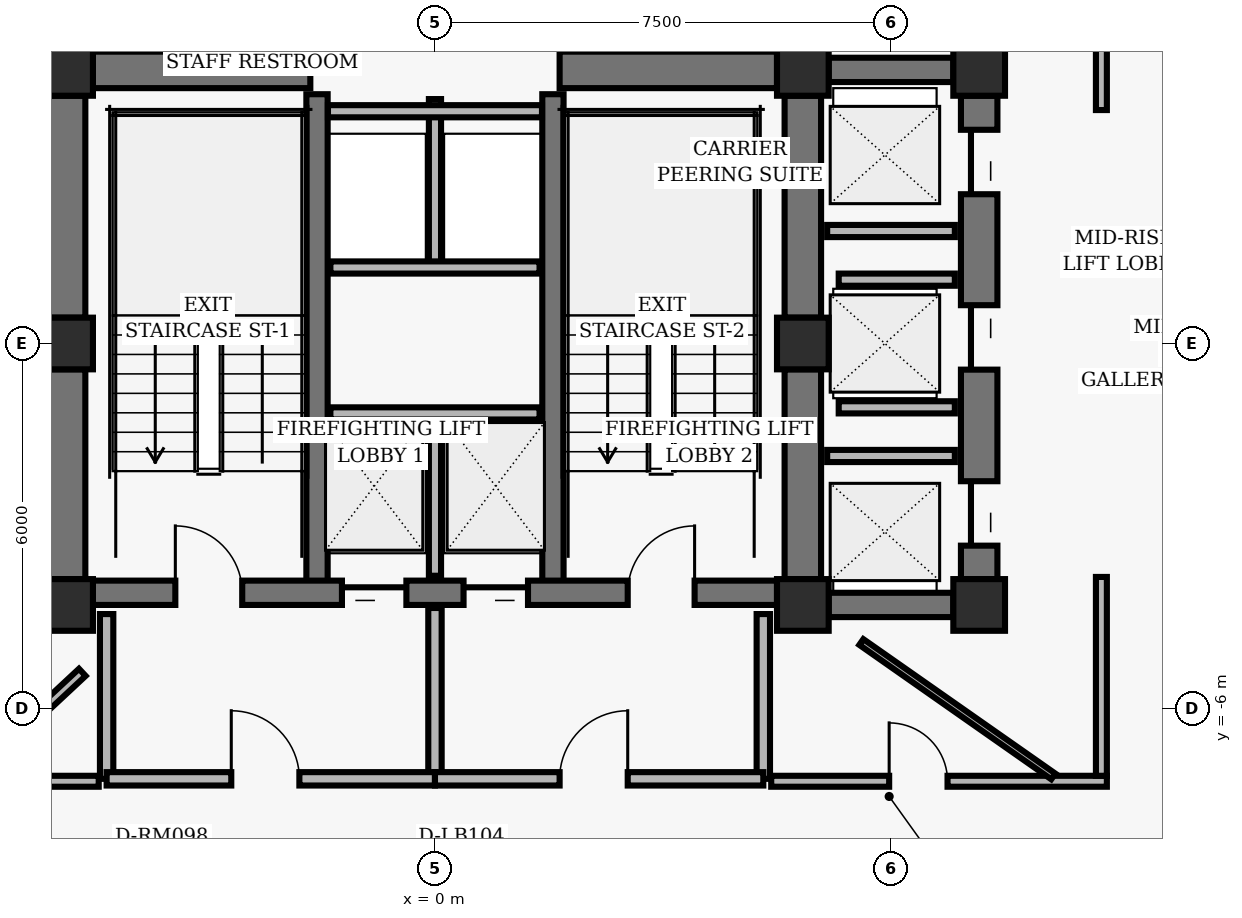
"""IFC4 building model, lengths in metres.
Left out: names, types, materials, properties, quantities, classifications, styles, units other than length and angle.
Written with IfcOpenShell. Run it as: python <this file> out.ifc"""

import sys

from ifc_helpers import new_model, si_unit, direction, frame, frame_2d, origin, origin_2d, place, context, subcontext, project, spatial, rectangle, hollow_rectangle, extrude, element, fill, save


model = new_model("IFC4")
c1 = context("Model", 3, precision=1e-05, world=origin(), true_north=direction((0.0, 1.0)))
c2 = subcontext(c1, "Body", "Model", "MODEL_VIEW")
j1 = project(units=[si_unit("LENGTHUNIT", "METRE"), si_unit("PLANEANGLEUNIT", "RADIAN")], contexts=[c1])
p1 = place(None, origin())
s1 = spatial("IfcSite", under=j1, at=p1, CompositionType="ELEMENT")
p2 = place(p1, origin())
s2 = spatial("IfcBuilding", under=s1, at=p2, CompositionType="ELEMENT")
p3 = place(p2, frame((0.0, 0.0, 113.76)))
s3 = spatial("IfcBuildingStorey", under=s2, at=p3, CompositionType="ELEMENT", Elevation=113.76)
for number, where, z_axis, x_axis in (
    (1, (-6.05, 4.5, 0.0), (0.0, 0.0, 1.0), (1.0, 0.0, 0.0)),
    (2, (6.05, 4.5, 0.0), (0.0, 0.0, 1.0), (1.0, 0.0, 0.0)),
    (3, (-6.05, 0.0, 0.0), (0.0, 0.0, 1.0), (1.0, 0.0, 0.0)),
    (4, (6.05, 0.0, 0.0), (0.0, 0.0, 1.0), (1.0, 0.0, 0.0)),
    (5, (-6.05, -4.3, 0.0), (0.0, 0.0, 1.0), (1.0, 0.0, 0.0)),
    (6, (6.05, -4.3, 0.0), (0.0, 0.0, 1.0), (1.0, 0.0, 0.0)),
    (7, (8.95, 4.5, 0.0), (0.0, 0.0, 1.0), (1.0, 0.0, 0.0)),
    (8, (8.95, -4.3, 0.0), (0.0, 0.0, 1.0), (1.0, 0.0, 0.0)),
):
    element("IfcColumn", number, at=place(p3, frame(where, z_axis=z_axis, x_axis=x_axis)), inside=s3, PredefinedType="COLUMN", context=c2, shape_type="SweptSolid", body=[
        extrude(hollow_rectangle(XDim=0.85, YDim=0.85, WallThickness=0.055, InnerFilletRadius=0.02, OuterFilletRadius=0.04, at=origin_2d()), origin(), (0.0, 0.0, 1.0), 3.04),
    ])
p4 = place(p3, frame((-6.05, 0.425, 0.0), z_axis=(0.0, 0.0, 1.0), x_axis=(0.0, 1.0, 0.0)))
e9 = element("IfcWall", 9, at=p4, inside=s3, PredefinedType="SHEAR", context=c2, shape_type="SweptSolid", body=[
    extrude(rectangle(XDim=3.65, YDim=0.6, at=frame_2d((1.825, 0.0))), origin(), (0.0, 0.0, 1.0), 2.788),
])
p5 = place(p3, frame((-6.05, -3.875, 0.0), z_axis=(0.0, 0.0, 1.0), x_axis=(0.0, 1.0, 0.0)))
e10 = element("IfcWall", 10, at=p5, inside=s3, PredefinedType="SHEAR", context=c2, shape_type="SweptSolid", body=[
    extrude(rectangle(XDim=3.45, YDim=0.6, at=frame_2d((1.725, 0.0))), origin(), (0.0, 0.0, 1.0), 2.788),
])
p6 = place(p3, frame((6.05, 0.425, 0.0), z_axis=(0.0, 0.0, 1.0), x_axis=(0.0, 1.0, 0.0)))
e11 = element("IfcWall", 11, at=p6, inside=s3, PredefinedType="SHEAR", context=c2, shape_type="SweptSolid", body=[
    extrude(rectangle(XDim=3.65, YDim=0.6, at=frame_2d((1.825, 0.0))), origin(), (0.0, 0.0, 1.0), 2.788),
])
p7 = place(p3, frame((6.05, -3.875, 0.0), z_axis=(0.0, 0.0, 1.0), x_axis=(0.0, 1.0, 0.0)))
e12 = element("IfcWall", 12, at=p7, inside=s3, PredefinedType="SHEAR", context=c2, shape_type="SweptSolid", body=[
    extrude(rectangle(XDim=3.45, YDim=0.6, at=frame_2d((1.725, 0.0))), origin(), (0.0, 0.0, 1.0), 2.788),
])
for number, where, z_axis, x_axis in (
    (13, (-1.94, -4.1, 0.0), (0.0, 0.0, 1.0), (0.0, 1.0, 0.0)),
    (14, (1.94, -4.1, 0.0), (0.0, 0.0, 1.0), (0.0, 1.0, 0.0)),
):
    element("IfcWall", number, at=place(p3, frame(where, z_axis=z_axis, x_axis=x_axis)), inside=s3, PredefinedType="SHEAR", context=c2, shape_type="SweptSolid", body=[
        extrude(rectangle(XDim=8.2, YDim=0.35, at=frame_2d((4.1, 0.0))), origin(), (0.0, 0.0, 1.0), 2.788),
    ])
p8 = place(p3, frame((-5.625, -4.1, 0.0), z_axis=(0.0, 0.0, 1.0), x_axis=(1.0, 0.0, 0.0)))
e15 = element("IfcWall", 15, at=p8, inside=s3, PredefinedType="SHEAR", context=c2, shape_type="SweptSolid", body=[
    extrude(rectangle(XDim=11.25, YDim=0.4, at=frame_2d((5.625, 0.0))), origin(), (0.0, 0.0, 1.0), 2.788),
])
p9 = place(p8, frame((1.355, 0.0, 0.0)))
e16 = element("IfcOpeningElement", 16, at=p9, cuts=e15, PredefinedType="OPENING", context=c2, shape_type="SweptSolid", body=[
    extrude(rectangle(XDim=1.1, YDim=2.04, at=frame_2d((0.55, 1.02))), frame((0.0, 0.21, 0.0), z_axis=(0.0, -1.0, 0.0), x_axis=(1.0, 0.0, 0.0)), (0.0, 0.0, 1.0), 0.42),
])
p10 = place(p8, frame((8.795, 0.0, 0.0)))
e17 = element("IfcOpeningElement", 17, at=p10, cuts=e15, PredefinedType="OPENING", context=c2, shape_type="SweptSolid", body=[
    extrude(rectangle(XDim=1.1, YDim=2.04, at=frame_2d((0.55, 1.02))), frame((0.0, 0.21, 0.0), z_axis=(0.0, -1.0, 0.0), x_axis=(1.0, 0.0, 0.0)), (0.0, 0.0, 1.0), 0.42),
])
p11 = place(p8, frame((4.095, 0.0, 0.0)))
e18 = element("IfcOpeningElement", 18, at=p11, cuts=e15, PredefinedType="OPENING", context=c2, shape_type="SweptSolid", body=[
    extrude(rectangle(XDim=1.06, YDim=2.04, at=frame_2d((0.53, 1.02))), frame((0.0, 0.21, 0.0), z_axis=(0.0, -1.0, 0.0), x_axis=(1.0, 0.0, 0.0)), (0.0, 0.0, 1.0), 0.42),
])
p12 = place(p8, frame((6.095, 0.0, 0.0)))
e19 = element("IfcOpeningElement", 19, at=p12, cuts=e15, PredefinedType="OPENING", context=c2, shape_type="SweptSolid", body=[
    extrude(rectangle(XDim=1.06, YDim=2.04, at=frame_2d((0.53, 1.02))), frame((0.0, 0.21, 0.0), z_axis=(0.0, -1.0, 0.0), x_axis=(1.0, 0.0, 0.0)), (0.0, 0.0, 1.0), 0.42),
])
for number, where, z_axis, x_axis in (
    (20, (-5.625, 4.5, 0.0), (0.0, 0.0, 1.0), (1.0, 0.0, 0.0)),
    (21, (2.05, 4.5, 0.0), (0.0, 0.0, 1.0), (1.0, 0.0, 0.0)),
):
    element("IfcWall", number, at=place(p3, frame(where, z_axis=z_axis, x_axis=x_axis)), inside=s3, PredefinedType="SHEAR", context=c2, shape_type="SweptSolid", body=[
        extrude(rectangle(XDim=3.575, YDim=0.6, at=frame_2d((1.788, 0.0))), origin(), (0.0, 0.0, 1.0), 2.788),
    ])
p13 = place(p3, frame((8.95, -3.875, 0.0), z_axis=(0.0, 0.0, 1.0), x_axis=(0.0, 1.0, 0.0)))
e22 = element("IfcWall", 22, at=p13, inside=s3, PredefinedType="SHEAR", context=c2, shape_type="SweptSolid", body=[
    extrude(rectangle(XDim=7.95, YDim=0.6, at=frame_2d((3.975, 0.0))), origin(), (0.0, 0.0, 1.0), 2.788),
])
p14 = place(p13, frame((0.55, 0.0, 0.0)))
e23 = element("IfcOpeningElement", 23, at=p14, cuts=e22, PredefinedType="OPENING", context=c2, shape_type="SweptSolid", body=[
    extrude(rectangle(XDim=1.06, YDim=2.04, at=frame_2d((0.53, 1.02))), frame((0.0, 0.31, 0.0), z_axis=(0.0, -1.0, 0.0), x_axis=(1.0, 0.0, 0.0)), (0.0, 0.0, 1.0), 0.62),
])
p15 = place(p13, frame((3.445, 0.0, 0.0)))
e24 = element("IfcOpeningElement", 24, at=p15, cuts=e22, PredefinedType="OPENING", context=c2, shape_type="SweptSolid", body=[
    extrude(rectangle(XDim=1.06, YDim=2.04, at=frame_2d((0.53, 1.02))), frame((0.0, 0.31, 0.0), z_axis=(0.0, -1.0, 0.0), x_axis=(1.0, 0.0, 0.0)), (0.0, 0.0, 1.0), 0.62),
])
p16 = place(p13, frame((6.33, 0.0, 0.0)))
e25 = element("IfcOpeningElement", 25, at=p16, cuts=e22, PredefinedType="OPENING", context=c2, shape_type="SweptSolid", body=[
    extrude(rectangle(XDim=1.06, YDim=2.04, at=frame_2d((0.53, 1.02))), frame((0.0, 0.31, 0.0), z_axis=(0.0, -1.0, 0.0), x_axis=(1.0, 0.0, 0.0)), (0.0, 0.0, 1.0), 0.62),
])
for number, where, z_axis, x_axis in (
    (26, (6.475, 4.5, 0.0), (0.0, 0.0, 1.0), (1.0, 0.0, 0.0)),
    (27, (6.475, -4.3, 0.0), (0.0, 0.0, 1.0), (1.0, 0.0, 0.0)),
):
    element("IfcWall", number, at=place(p3, frame(where, z_axis=z_axis, x_axis=x_axis)), inside=s3, PredefinedType="SHEAR", context=c2, shape_type="SweptSolid", body=[
        extrude(rectangle(XDim=2.05, YDim=0.4, at=frame_2d((1.025, 0.0))), origin(), (0.0, 0.0, 1.0), 2.788),
    ])
p17 = place(p3, frame((0.0, -3.82, 0.0), z_axis=(0.0, 0.0, 1.0), x_axis=(0.0, 1.0, 0.0)))
e28 = element("IfcWall", 28, at=p17, inside=s3, PredefinedType="PARTITIONING", context=c2, shape_type="SweptSolid", body=[
    extrude(rectangle(XDim=2.67, YDim=0.2, at=frame_2d((1.335, 0.0))), origin(), (0.0, 0.0, 1.0), 2.763),
])
p18 = place(p3, frame((-1.72, -1.15, 0.0), z_axis=(0.0, 0.0, 1.0), x_axis=(1.0, 0.0, 0.0)))
e29 = element("IfcWall", 29, at=p18, inside=s3, PredefinedType="PARTITIONING", context=c2, shape_type="SweptSolid", body=[
    extrude(rectangle(XDim=3.44, YDim=0.2, at=frame_2d((1.72, 0.0))), origin(), (0.0, 0.0, 1.0), 2.763),
])
for number, where, z_axis, x_axis in (
    (30, (-5.4, -7.16, 0.0), (0.0, 0.0, 1.0), (0.0, 1.0, 0.0)),
    (31, (5.4, -7.16, 0.0), (0.0, 0.0, 1.0), (0.0, 1.0, 0.0)),
):
    element("IfcWall", number, at=place(p3, frame(where, z_axis=z_axis, x_axis=x_axis)), inside=s3, PredefinedType="PARTITIONING", context=c2, shape_type="SweptSolid", body=[
        extrude(rectangle(XDim=2.71, YDim=0.22, at=frame_2d((1.355, 0.0))), origin(), (0.0, 0.0, 1.0), 2.763),
    ])
p19 = place(p3, frame((0.0, -7.16, 0.0), z_axis=(0.0, 0.0, 1.0), x_axis=(0.0, 1.0, 0.0)))
e32 = element("IfcWall", 32, at=p19, inside=s3, PredefinedType="PARTITIONING", context=c2, shape_type="SweptSolid", body=[
    extrude(rectangle(XDim=2.81, YDim=0.22, at=frame_2d((1.405, 0.0))), origin(), (0.0, 0.0, 1.0), 2.763),
])
p20 = place(p3, frame((-5.4, -7.16, 0.0), z_axis=(0.0, 0.0, 1.0), x_axis=(1.0, 0.0, 0.0)))
e33 = element("IfcWall", 33, at=p20, inside=s3, PredefinedType="PARTITIONING", context=c2, shape_type="SweptSolid", body=[
    extrude(rectangle(XDim=5.4, YDim=0.22, at=frame_2d((2.7, 0.0))), origin(), (0.0, 0.0, 1.0), 2.33),
])
p21 = place(p20, frame((2.05, 0.0, 0.0)))
e34 = element("IfcOpeningElement", 34, at=p21, cuts=e33, PredefinedType="OPENING", context=c2, shape_type="SweptSolid", body=[
    extrude(rectangle(XDim=1.12, YDim=2.02, at=frame_2d((0.56, 1.01))), frame((0.0, 0.12, 0.0), z_axis=(0.0, -1.0, 0.0), x_axis=(1.0, 0.0, 0.0)), (0.0, 0.0, 1.0), 0.24),
])
p22 = place(p3, frame((0.0, -7.16, 0.0), z_axis=(0.0, 0.0, 1.0), x_axis=(1.0, 0.0, 0.0)))
e35 = element("IfcWall", 35, at=p22, inside=s3, PredefinedType="PARTITIONING", context=c2, shape_type="SweptSolid", body=[
    extrude(rectangle(XDim=5.4, YDim=0.22, at=frame_2d((2.7, 0.0))), origin(), (0.0, 0.0, 1.0), 2.33),
])
p23 = place(p22, frame((2.05, 0.0, 0.0)))
e36 = element("IfcOpeningElement", 36, at=p23, cuts=e35, PredefinedType="OPENING", context=c2, shape_type="SweptSolid", body=[
    extrude(rectangle(XDim=1.12, YDim=2.02, at=frame_2d((0.56, 1.01))), frame((0.0, 0.12, 0.0), z_axis=(0.0, -1.0, 0.0), x_axis=(1.0, 0.0, 0.0)), (0.0, 0.0, 1.0), 0.24),
])
p24 = place(p3, frame((0.0, 1.25, 0.0), z_axis=(0.0, 0.0, 1.0), x_axis=(0.0, 1.0, 0.0)))
e37 = element("IfcWall", 37, at=p24, inside=s3, PredefinedType="PARTITIONING", context=c2, shape_type="SweptSolid", body=[
    extrude(rectangle(XDim=2.77, YDim=0.2, at=frame_2d((1.385, 0.0))), origin(), (0.0, 0.0, 1.0), 2.763),
])
p25 = place(p3, frame((-1.72, 1.25, 0.0), z_axis=(0.0, 0.0, 1.0), x_axis=(1.0, 0.0, 0.0)))
e38 = element("IfcWall", 38, at=p25, inside=s3, PredefinedType="PARTITIONING", context=c2, shape_type="SweptSolid", body=[
    extrude(rectangle(XDim=3.44, YDim=0.2, at=frame_2d((1.72, 0.0))), origin(), (0.0, 0.0, 1.0), 2.763),
])
p26 = place(p3, frame((-1.76, 3.82, 0.0), z_axis=(0.0, 0.0, 1.0), x_axis=(1.0, 0.0, 0.0)))
e39 = element("IfcWall", 39, at=p26, inside=s3, PredefinedType="PARTITIONING", context=c2, shape_type="SweptSolid", body=[
    extrude(rectangle(XDim=3.52, YDim=0.2, at=frame_2d((1.76, 0.0))), origin(), (0.0, 0.0, 1.0), 2.763),
])
for number, where, z_axis, x_axis in (
    (40, (6.45, -1.85, 0.0), (0.0, 0.0, 1.0), (1.0, 0.0, 0.0)),
    (41, (6.45, 1.85, 0.0), (0.0, 0.0, 1.0), (1.0, 0.0, 0.0)),
):
    element("IfcWall", number, at=place(p3, frame(where, z_axis=z_axis, x_axis=x_axis)), inside=s3, PredefinedType="PARTITIONING", context=c2, shape_type="SweptSolid", body=[
        extrude(rectangle(XDim=2.1, YDim=0.2, at=frame_2d((1.05, 0.0))), origin(), (0.0, 0.0, 1.0), 2.763),
    ])
for number, where, z_axis, x_axis in (
    (42, (6.64, -1.05, 0.0), (0.0, 0.0, 1.0), (1.0, 0.0, 0.0)),
    (43, (6.64, 1.05, 0.0), (0.0, 0.0, 1.0), (1.0, 0.0, 0.0)),
):
    element("IfcWall", number, at=place(p3, frame(where, z_axis=z_axis, x_axis=x_axis)), inside=s3, PredefinedType="PARTITIONING", context=c2, shape_type="SweptSolid", body=[
        extrude(rectangle(XDim=1.91, YDim=0.2, at=frame_2d((0.955, 0.0))), origin(), (0.0, 0.0, 1.0), 2.763),
    ])
p27 = place(p3, frame((10.263, 9.077, 0.0), z_axis=(0.0, 0.0, 1.0), x_axis=(0.587780951295, -0.809020119215, 0.0)))
e44 = element("IfcWall", 44, at=p27, inside=s3, PredefinedType="PARTITIONING", context=c2, shape_type="SweptSolid", body=[
    extrude(rectangle(XDim=7.469, YDim=0.18, at=frame_2d((3.734, 0.0))), origin(), (0.0, 0.0, 1.0), 2.763),
])
p28 = place(p27, frame((4.139, 0.0, 0.0)))
e45 = element("IfcOpeningElement", 45, at=p28, cuts=e44, PredefinedType="OPENING", context=c2, shape_type="SweptSolid", body=[
    extrude(rectangle(XDim=0.96, YDim=2.02, at=frame_2d((0.48, 1.01))), frame((0.0, 0.1, 0.0), z_axis=(0.0, -1.0, 0.0), x_axis=(1.0, 0.0, 0.0)), (0.0, 0.0, 1.0), 0.2),
])
p29 = place(p3, frame((5.53, -7.2, 0.0), z_axis=(0.0, 0.0, 1.0), x_axis=(1.0, 0.0, 0.0)))
e46 = element("IfcWall", 46, at=p29, inside=s3, PredefinedType="PARTITIONING", context=c2, shape_type="SweptSolid", body=[
    extrude(rectangle(XDim=5.52, YDim=0.18, at=frame_2d((2.76, 0.0))), origin(), (0.0, 0.0, 1.0), 2.33),
])
p30 = place(p29, frame((1.94, 0.0, 0.0)))
e47 = element("IfcOpeningElement", 47, at=p30, cuts=e46, PredefinedType="OPENING", context=c2, shape_type="SweptSolid", body=[
    extrude(rectangle(XDim=0.96, YDim=2.02, at=frame_2d((0.48, 1.01))), frame((0.0, 0.1, 0.0), z_axis=(0.0, -1.0, 0.0), x_axis=(1.0, 0.0, 0.0)), (0.0, 0.0, 1.0), 0.2),
])
for number, where, z_axis, x_axis in (
    (48, (10.96, -7.11, 0.0), (0.0, 0.0, 1.0), (0.0, 1.0, 0.0)),
    (49, (10.96, 3.84, 0.0), (0.0, 0.0, 1.0), (0.0, 1.0, 0.0)),
):
    element("IfcWall", number, at=place(p3, frame(where, z_axis=z_axis, x_axis=x_axis)), inside=s3, PredefinedType="PARTITIONING", context=c2, shape_type="SweptSolid", body=[
        extrude(rectangle(XDim=3.271, YDim=0.18, at=frame_2d((1.635, 0.0))), origin(), (0.0, 0.0, 1.0), 2.763),
    ])
p31 = place(p3, frame((-6.59, -7.2, 0.0), z_axis=(0.0, 0.0, 1.0), x_axis=(1.0, 0.0, 0.0)))
e50 = element("IfcWall", 50, at=p31, inside=s3, PredefinedType="PARTITIONING", context=c2, shape_type="SweptSolid", body=[
    extrude(rectangle(XDim=1.06, YDim=0.18, at=frame_2d((0.53, 0.0))), origin(), (0.0, 0.0, 1.0), 2.33),
])
p32 = place(p3, frame((-5.8, -5.409, 0.0), z_axis=(0.0, 0.0, 1.0), x_axis=(-0.731304251281, -0.682051385204, 0.0)))
e51 = element("IfcWall", 51, at=p32, inside=s3, PredefinedType="PARTITIONING", context=c2, shape_type="SweptSolid", body=[
    extrude(rectangle(XDim=0.848, YDim=0.16, at=frame_2d((0.424, 0.0))), origin(), (0.0, 0.0, 1.0), 2.763),
])
p33 = place(p3, frame((7.012, -4.91, 0.0), z_axis=(0.0, 0.0, 1.0), x_axis=(0.819130700295, -0.573606917526, 0.0)))
e52 = element("IfcWall", 52, at=p33, inside=s3, PredefinedType="MOVABLE", context=c2, shape_type="SweptSolid", body=[
    extrude(rectangle(XDim=3.853, YDim=0.115, at=frame_2d((1.927, 0.0))), origin(), (0.0, 0.0, 1.0), 2.763),
])
p34 = place(p9, origin())
e53 = element("IfcDoor", 53, at=p34, inside=s3, OperationType="SINGLE_SWING_LEFT", PredefinedType="DOOR", context=c2, shape_type="SweptSolid", body=[
    extrude(rectangle(XDim=1.1, YDim=2.04, at=frame_2d((0.55, 1.02))), frame((0.0, 0.025, 0.0), z_axis=(0.0, -1.0, 0.0), x_axis=(1.0, 0.0, 0.0)), (0.0, 0.0, 1.0), 0.05),
])
fill(e16, e53)
p35 = place(p10, origin())
e54 = element("IfcDoor", 54, at=p35, inside=s3, OperationType="SINGLE_SWING_RIGHT", PredefinedType="DOOR", context=c2, shape_type="SweptSolid", body=[
    extrude(rectangle(XDim=1.1, YDim=2.04, at=frame_2d((0.55, 1.02))), frame((0.0, 0.025, 0.0), z_axis=(0.0, -1.0, 0.0), x_axis=(1.0, 0.0, 0.0)), (0.0, 0.0, 1.0), 0.05),
])
fill(e17, e54)
p36 = place(p11, origin())
e55 = element("IfcDoor", 55, at=p36, inside=s3, OperationType="SLIDING_TO_LEFT", PredefinedType="DOOR", context=c2, shape_type="SweptSolid", body=[
    extrude(rectangle(XDim=1.06, YDim=2.04, at=frame_2d((0.53, 1.02))), frame((0.0, 0.025, 0.0), z_axis=(0.0, -1.0, 0.0), x_axis=(1.0, 0.0, 0.0)), (0.0, 0.0, 1.0), 0.05),
])
fill(e18, e55)
p37 = place(p12, origin())
e56 = element("IfcDoor", 56, at=p37, inside=s3, OperationType="SLIDING_TO_RIGHT", PredefinedType="DOOR", context=c2, shape_type="SweptSolid", body=[
    extrude(rectangle(XDim=1.06, YDim=2.04, at=frame_2d((0.53, 1.02))), frame((0.0, 0.025, 0.0), z_axis=(0.0, -1.0, 0.0), x_axis=(1.0, 0.0, 0.0)), (0.0, 0.0, 1.0), 0.05),
])
fill(e19, e56)
p38 = place(p21, origin())
e57 = element("IfcDoor", 57, at=p38, inside=s3, OperationType="SINGLE_SWING_LEFT", PredefinedType="DOOR", context=c2, shape_type="SweptSolid", body=[
    extrude(rectangle(XDim=1.12, YDim=2.02, at=frame_2d((0.56, 1.01))), frame((0.0, 0.025, 0.0), z_axis=(0.0, -1.0, 0.0), x_axis=(1.0, 0.0, 0.0)), (0.0, 0.0, 1.0), 0.05),
])
fill(e34, e57)
p39 = place(p23, origin())
e58 = element("IfcDoor", 58, at=p39, inside=s3, OperationType="SINGLE_SWING_RIGHT", PredefinedType="DOOR", context=c2, shape_type="SweptSolid", body=[
    extrude(rectangle(XDim=1.12, YDim=2.02, at=frame_2d((0.56, 1.01))), frame((0.0, 0.025, 0.0), z_axis=(0.0, -1.0, 0.0), x_axis=(1.0, 0.0, 0.0)), (0.0, 0.0, 1.0), 0.05),
])
fill(e36, e58)
p40 = place(p14, origin())
e59 = element("IfcDoor", 59, at=p40, inside=s3, OperationType="SLIDING_TO_LEFT", PredefinedType="DOOR", context=c2, shape_type="SweptSolid", body=[
    extrude(rectangle(XDim=1.06, YDim=2.04, at=frame_2d((0.53, 1.02))), frame((0.0, 0.025, 0.0), z_axis=(0.0, -1.0, 0.0), x_axis=(1.0, 0.0, 0.0)), (0.0, 0.0, 1.0), 0.05),
])
fill(e23, e59)
p41 = place(p15, origin())
e60 = element("IfcDoor", 60, at=p41, inside=s3, OperationType="SLIDING_TO_RIGHT", PredefinedType="DOOR", context=c2, shape_type="SweptSolid", body=[
    extrude(rectangle(XDim=1.06, YDim=2.04, at=frame_2d((0.53, 1.02))), frame((0.0, 0.025, 0.0), z_axis=(0.0, -1.0, 0.0), x_axis=(1.0, 0.0, 0.0)), (0.0, 0.0, 1.0), 0.05),
])
fill(e24, e60)
p42 = place(p16, origin())
e61 = element("IfcDoor", 61, at=p42, inside=s3, OperationType="SLIDING_TO_LEFT", PredefinedType="DOOR", context=c2, shape_type="SweptSolid", body=[
    extrude(rectangle(XDim=1.06, YDim=2.04, at=frame_2d((0.53, 1.02))), frame((0.0, 0.025, 0.0), z_axis=(0.0, -1.0, 0.0), x_axis=(1.0, 0.0, 0.0)), (0.0, 0.0, 1.0), 0.05),
])
fill(e25, e61)
p43 = place(p30, origin())
e62 = element("IfcDoor", 62, at=p43, inside=s3, OperationType="SINGLE_SWING_LEFT", PredefinedType="DOOR", context=c2, shape_type="SweptSolid", body=[
    extrude(rectangle(XDim=0.96, YDim=2.02, at=frame_2d((0.48, 1.01))), frame((0.0, 0.025, 0.0), z_axis=(0.0, -1.0, 0.0), x_axis=(1.0, 0.0, 0.0)), (0.0, 0.0, 1.0), 0.05),
])
fill(e47, e62)
save(model, sys.argv[1])
